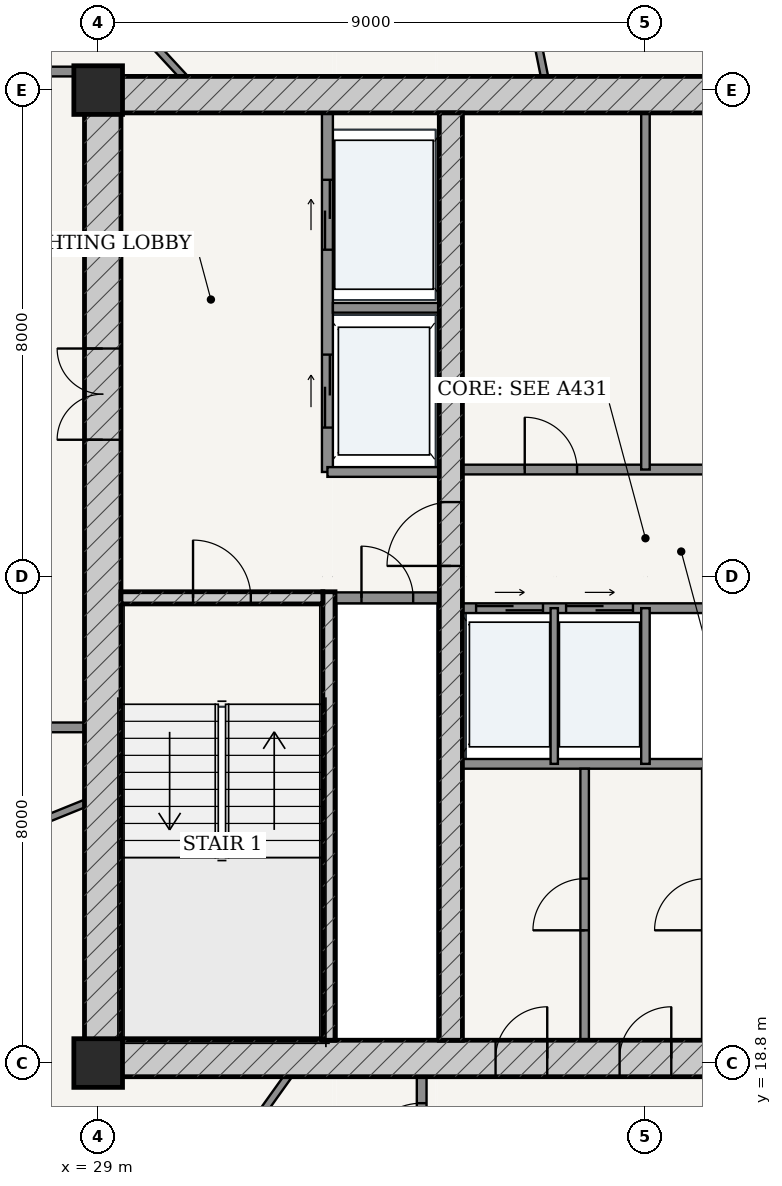
"""IFC4 building model, lengths in metres.
Left out: names, types, materials, properties, quantities, classifications, styles, units other than length and angle.
Written with IfcOpenShell. Run it as: python <this file> out.ifc"""

import sys

from ifc_helpers import new_model, si_unit, direction, frame, frame_2d, origin, origin_2d, place, context, subcontext, project, spatial, rectangle, extrude, source, transform, mapped, element, fill, save


model = new_model("IFC4")
c1 = context("Model", 3, precision=1e-05, world=origin(), true_north=direction((-0.2419218956, 0.970295726276)))
c2 = subcontext(c1, "Body", "Model", "MODEL_VIEW")
j1 = project(units=[si_unit("LENGTHUNIT", "METRE"), si_unit("PLANEANGLEUNIT", "RADIAN")], contexts=[c1])
p1 = place(None, origin())
s1 = spatial("IfcSite", under=j1, at=p1, CompositionType="ELEMENT")
p2 = place(p1, origin())
s2 = spatial("IfcBuilding", under=s1, at=p2, CompositionType="ELEMENT")
p3 = place(p2, frame((0.0, 0.0, 239.3)))
s3 = spatial("IfcBuildingStorey", under=s2, at=p3, CompositionType="ELEMENT", Elevation=239.3)
for number, where, z_axis, x_axis in (
    (1, (29.0, 18.8, 0.0), (0.0, 0.0, 1.0), (1.0, 0.0, 0.0)),
    (2, (29.0, 34.8, 0.0), (0.0, 0.0, 1.0), (1.0, 0.0, 0.0)),
):
    element("IfcColumn", number, at=place(p3, frame(where, z_axis=z_axis, x_axis=x_axis)), inside=s3, PredefinedType="COLUMN", context=c2, shape_type="SweptSolid", body=[
        extrude(rectangle(XDim=0.8, YDim=0.8, at=origin_2d()), origin(), (0.0, 0.0, 1.0), 3.7),
    ])
p4 = place(p3, frame((28.775, 18.875, 0.0), z_axis=(0.0, 0.0, 1.0), x_axis=(1.0, 0.0, 0.0)))
e3 = element("IfcWall", 3, at=p4, inside=s3, PredefinedType="SHEAR", context=c2, shape_type="SweptSolid", body=[
    extrude(rectangle(XDim=18.45, YDim=0.6, at=frame_2d((9.225, 0.0))), origin(), (0.0, 0.0, 1.0), 3.25),
])
p5 = place(p4, frame((6.76, 0.0, 0.0)))
e4 = element("IfcOpeningElement", 4, at=p5, cuts=e3, PredefinedType="OPENING", context=c2, shape_type="SweptSolid", body=[
    extrude(rectangle(XDim=0.85, YDim=2.1, at=frame_2d((0.425, 1.05))), frame((0.0, 0.31, 0.0), z_axis=(0.0, -1.0, 0.0), x_axis=(1.0, 0.0, 0.0)), (0.0, 0.0, 1.0), 0.62),
])
p6 = place(p4, frame((8.8, 0.0, 0.0)))
e5 = element("IfcOpeningElement", 5, at=p6, cuts=e3, PredefinedType="OPENING", context=c2, shape_type="SweptSolid", body=[
    extrude(rectangle(XDim=0.85, YDim=2.1, at=frame_2d((0.425, 1.05))), frame((0.0, 0.31, 0.0), z_axis=(0.0, -1.0, 0.0), x_axis=(1.0, 0.0, 0.0)), (0.0, 0.0, 1.0), 0.62),
])
p7 = place(p4, frame((10.84, 0.0, 0.0)))
e6 = element("IfcOpeningElement", 6, at=p7, cuts=e3, PredefinedType="OPENING", context=c2, shape_type="SweptSolid", body=[
    extrude(rectangle(XDim=0.85, YDim=2.1, at=frame_2d((0.425, 1.05))), frame((0.0, 0.31, 0.0), z_axis=(0.0, -1.0, 0.0), x_axis=(1.0, 0.0, 0.0)), (0.0, 0.0, 1.0), 0.62),
])
p8 = place(p3, frame((28.775, 34.725, 0.0), z_axis=(0.0, 0.0, 1.0), x_axis=(1.0, 0.0, 0.0)))
e7 = element("IfcWall", 7, at=p8, inside=s3, PredefinedType="SHEAR", context=c2, shape_type="SweptSolid", body=[
    extrude(rectangle(XDim=18.45, YDim=0.6, at=frame_2d((9.225, 0.0))), origin(), (0.0, 0.0, 1.0), 3.25),
])
p9 = place(p3, frame((29.075, 19.175, 0.0), z_axis=(0.0, 0.0, 1.0), x_axis=(0.0, 1.0, 0.0)))
e8 = element("IfcWall", 8, at=p9, inside=s3, PredefinedType="SHEAR", context=c2, shape_type="SweptSolid", body=[
    extrude(rectangle(XDim=15.25, YDim=0.6, at=frame_2d((7.625, 0.0))), origin(), (0.0, 0.0, 1.0), 3.25),
])
p10 = place(p9, frame((9.875, 0.0, 0.0)))
e9 = element("IfcOpeningElement", 9, at=p10, cuts=e8, PredefinedType="OPENING", context=c2, shape_type="SweptSolid", body=[
    extrude(rectangle(XDim=1.5, YDim=2.2, at=frame_2d((0.75, 1.1))), frame((0.0, 0.31, 0.0), z_axis=(0.0, -1.0, 0.0), x_axis=(1.0, 0.0, 0.0)), (0.0, 0.0, 1.0), 0.62),
])
p11 = place(p3, frame((32.795, 19.175, 0.0), z_axis=(0.0, 0.0, 1.0), x_axis=(0.0, 1.0, 0.0)))
e10 = element("IfcWall", 10, at=p11, inside=s3, PredefinedType="SOLIDWALL", context=c2, shape_type="SweptSolid", body=[
    extrude(rectangle(XDim=7.375, YDim=0.2, at=frame_2d((3.688, 0.0))), origin(), (0.0, 0.0, 1.0), 3.25),
])
p12 = place(p3, frame((29.375, 26.45, 0.0), z_axis=(0.0, 0.0, 1.0), x_axis=(1.0, 0.0, 0.0)))
e11 = element("IfcWall", 11, at=p12, inside=s3, PredefinedType="SOLIDWALL", context=c2, shape_type="SweptSolid", body=[
    extrude(rectangle(XDim=3.32, YDim=0.2, at=frame_2d((1.66, 0.0))), origin(), (0.0, 0.0, 1.0), 3.25),
])
p13 = place(p12, frame((1.185, 0.0, 0.0)))
e12 = element("IfcOpeningElement", 12, at=p13, cuts=e11, PredefinedType="OPENING", context=c2, shape_type="SweptSolid", body=[
    extrude(rectangle(XDim=0.95, YDim=2.15, at=frame_2d((0.475, 1.075))), frame((0.0, 0.11, 0.0), z_axis=(0.0, -1.0, 0.0), x_axis=(1.0, 0.0, 0.0)), (0.0, 0.0, 1.0), 0.22),
])
p14 = place(p3, frame((34.8, 19.175, 0.0), z_axis=(0.0, 0.0, 1.0), x_axis=(0.0, 1.0, 0.0)))
e13 = element("IfcWall", 13, at=p14, inside=s3, PredefinedType="SHEAR", context=c2, shape_type="SweptSolid", body=[
    extrude(rectangle(XDim=15.25, YDim=0.38, at=frame_2d((7.625, 0.0))), origin(), (0.0, 0.0, 1.0), 3.25),
])
p15 = place(p14, frame((7.8, 0.0, 0.0)))
e14 = element("IfcOpeningElement", 14, at=p15, cuts=e13, PredefinedType="OPENING", context=c2, shape_type="SweptSolid", body=[
    extrude(rectangle(XDim=1.05, YDim=2.15, at=frame_2d((0.525, 1.075))), frame((0.0, 0.2, 0.0), z_axis=(0.0, -1.0, 0.0), x_axis=(1.0, 0.0, 0.0)), (0.0, 0.0, 1.0), 0.4),
])
p16 = place(p3, frame((32.9, 26.45, 0.0), z_axis=(0.0, 0.0, 1.0), x_axis=(1.0, 0.0, 0.0)))
e15 = element("IfcWall", 15, at=p16, inside=s3, PredefinedType="PARTITIONING", context=c2, shape_type="SweptSolid", body=[
    extrude(rectangle(XDim=1.71, YDim=0.18, at=frame_2d((0.855, 0.0))), origin(), (0.0, 0.0, 1.0), 3.25),
])
p17 = place(p16, frame((0.43, 0.0, 0.0)))
e16 = element("IfcOpeningElement", 16, at=p17, cuts=e15, PredefinedType="OPENING", context=c2, shape_type="SweptSolid", body=[
    extrude(rectangle(XDim=0.85, YDim=2.1, at=frame_2d((0.425, 1.05))), frame((0.0, 0.1, 0.0), z_axis=(0.0, -1.0, 0.0), x_axis=(1.0, 0.0, 0.0)), (0.0, 0.0, 1.0), 0.2),
])
p18 = place(p3, frame((32.77, 28.52, 0.0), z_axis=(0.0, 0.0, 1.0), x_axis=(0.0, 1.0, 0.0)))
e17 = element("IfcWall", 17, at=p18, inside=s3, PredefinedType="PARTITIONING", context=c2, shape_type="SweptSolid", body=[
    extrude(rectangle(XDim=5.905, YDim=0.18, at=frame_2d((2.953, 0.0))), origin(), (0.0, 0.0, 1.0), 3.25),
])
p19 = place(p18, frame((3.655, 0.0, 0.0)))
e18 = element("IfcOpeningElement", 18, at=p19, cuts=e17, PredefinedType="OPENING", context=c2, shape_type="SweptSolid", body=[
    extrude(rectangle(XDim=1.15, YDim=2.2, at=frame_2d((0.575, 1.1))), frame((0.0, 0.1, 0.0), z_axis=(0.0, -1.0, 0.0), x_axis=(1.0, 0.0, 0.0)), (0.0, 0.0, 1.0), 0.2),
])
p20 = place(p18, frame((0.73, 0.0, 0.0)))
e19 = element("IfcOpeningElement", 19, at=p20, cuts=e17, PredefinedType="OPENING", context=c2, shape_type="SweptSolid", body=[
    extrude(rectangle(XDim=1.2, YDim=2.25, at=frame_2d((0.6, 1.125))), frame((0.0, 0.1, 0.0), z_axis=(0.0, -1.0, 0.0), x_axis=(1.0, 0.0, 0.0)), (0.0, 0.0, 1.0), 0.2),
])
p21 = place(p3, frame((32.86, 31.22, 0.0), z_axis=(0.0, 0.0, 1.0), x_axis=(1.0, 0.0, 0.0)))
e20 = element("IfcWall", 20, at=p21, inside=s3, PredefinedType="PARTITIONING", context=c2, shape_type="SweptSolid", body=[
    extrude(rectangle(XDim=1.75, YDim=0.16, at=frame_2d((0.875, 0.0))), origin(), (0.0, 0.0, 1.0), 3.25),
])
p22 = place(p3, frame((32.77, 28.52, 0.0), z_axis=(0.0, 0.0, 1.0), x_axis=(1.0, 0.0, 0.0)))
e21 = element("IfcWall", 21, at=p22, inside=s3, PredefinedType="PARTITIONING", context=c2, shape_type="SweptSolid", body=[
    extrude(rectangle(XDim=1.84, YDim=0.16, at=frame_2d((0.92, 0.0))), origin(), (0.0, 0.0, 1.0), 3.25),
])
p23 = place(p3, frame((34.99, 28.56, 0.0), z_axis=(0.0, 0.0, 1.0), x_axis=(1.0, 0.0, 0.0)))
e22 = element("IfcWall", 22, at=p23, inside=s3, PredefinedType="PARTITIONING", context=c2, shape_type="SweptSolid", body=[
    extrude(rectangle(XDim=6.02, YDim=0.16, at=frame_2d((3.01, 0.0))), origin(), (0.0, 0.0, 1.0), 3.25),
])
p24 = place(p23, frame((1.025, 0.0, 0.0)))
e23 = element("IfcOpeningElement", 23, at=p24, cuts=e22, PredefinedType="OPENING", context=c2, shape_type="SweptSolid", body=[
    extrude(rectangle(XDim=0.86, YDim=2.1, at=frame_2d((0.43, 1.05))), frame((0.0, 0.09, 0.0), z_axis=(0.0, -1.0, 0.0), x_axis=(1.0, 0.0, 0.0)), (0.0, 0.0, 1.0), 0.18),
])
p25 = place(p23, frame((4.14, 0.0, 0.0)))
e24 = element("IfcOpeningElement", 24, at=p25, cuts=e22, PredefinedType="OPENING", context=c2, shape_type="SweptSolid", body=[
    extrude(rectangle(XDim=0.85, YDim=2.1, at=frame_2d((0.425, 1.05))), frame((0.0, 0.09, 0.0), z_axis=(0.0, -1.0, 0.0), x_axis=(1.0, 0.0, 0.0)), (0.0, 0.0, 1.0), 0.18),
])
p26 = place(p3, frame((38.0, 28.56, 0.0), z_axis=(0.0, 0.0, 1.0), x_axis=(0.0, 1.0, 0.0)))
e25 = element("IfcWall", 25, at=p26, inside=s3, PredefinedType="PARTITIONING", context=c2, shape_type="SweptSolid", body=[
    extrude(rectangle(XDim=5.865, YDim=0.14, at=frame_2d((2.933, 0.0))), origin(), (0.0, 0.0, 1.0), 3.25),
])
p27 = place(p3, frame((34.99, 26.28, 0.0), z_axis=(0.0, 0.0, 1.0), x_axis=(1.0, 0.0, 0.0)))
e26 = element("IfcWall", 26, at=p27, inside=s3, PredefinedType="PARTITIONING", context=c2, shape_type="SweptSolid", body=[
    extrude(rectangle(XDim=6.02, YDim=0.16, at=frame_2d((3.01, 0.0))), origin(), (0.0, 0.0, 1.0), 3.25),
])
p28 = place(p27, frame((0.225, 0.0, 0.0)))
e27 = element("IfcOpeningElement", 27, at=p28, cuts=e26, PredefinedType="OPENING", context=c2, shape_type="SweptSolid", body=[
    extrude(rectangle(XDim=1.1, YDim=2.2, at=frame_2d((0.55, 1.1))), frame((0.0, 0.09, 0.0), z_axis=(0.0, -1.0, 0.0), x_axis=(1.0, 0.0, 0.0)), (0.0, 0.0, 1.0), 0.18),
])
p29 = place(p27, frame((1.705, 0.0, 0.0)))
e28 = element("IfcOpeningElement", 28, at=p29, cuts=e26, PredefinedType="OPENING", context=c2, shape_type="SweptSolid", body=[
    extrude(rectangle(XDim=1.1, YDim=2.2, at=frame_2d((0.55, 1.1))), frame((0.0, 0.09, 0.0), z_axis=(0.0, -1.0, 0.0), x_axis=(1.0, 0.0, 0.0)), (0.0, 0.0, 1.0), 0.18),
])
p30 = place(p3, frame((34.99, 23.72, 0.0), z_axis=(0.0, 0.0, 1.0), x_axis=(1.0, 0.0, 0.0)))
e29 = element("IfcWall", 29, at=p30, inside=s3, PredefinedType="PARTITIONING", context=c2, shape_type="SweptSolid", body=[
    extrude(rectangle(XDim=6.02, YDim=0.16, at=frame_2d((3.01, 0.0))), origin(), (0.0, 0.0, 1.0), 3.25),
])
p31 = place(p3, frame((36.5, 23.72, 0.0), z_axis=(0.0, 0.0, 1.0), x_axis=(0.0, 1.0, 0.0)))
e30 = element("IfcWall", 30, at=p31, inside=s3, PredefinedType="PARTITIONING", context=c2, shape_type="SweptSolid", body=[
    extrude(rectangle(XDim=2.56, YDim=0.12, at=frame_2d((1.28, 0.0))), origin(), (0.0, 0.0, 1.0), 3.25),
])
p32 = place(p3, frame((38.0, 23.72, 0.0), z_axis=(0.0, 0.0, 1.0), x_axis=(0.0, 1.0, 0.0)))
e31 = element("IfcWall", 31, at=p32, inside=s3, PredefinedType="PARTITIONING", context=c2, shape_type="SweptSolid", body=[
    extrude(rectangle(XDim=2.56, YDim=0.14, at=frame_2d((1.28, 0.0))), origin(), (0.0, 0.0, 1.0), 3.25),
])
p33 = place(p3, frame((37.0, 19.175, 0.0), z_axis=(0.0, 0.0, 1.0), x_axis=(0.0, 1.0, 0.0)))
e32 = element("IfcWall", 32, at=p33, inside=s3, PredefinedType="PARTITIONING", context=c2, shape_type="SweptSolid", body=[
    extrude(rectangle(XDim=4.465, YDim=0.14, at=frame_2d((2.232, 0.0))), origin(), (0.0, 0.0, 1.0), 3.25),
])
p34 = place(p33, frame((1.808, 0.0, 0.0)))
e33 = element("IfcOpeningElement", 33, at=p34, cuts=e32, PredefinedType="OPENING", context=c2, shape_type="SweptSolid", body=[
    extrude(rectangle(XDim=0.85, YDim=2.1, at=frame_2d((0.425, 1.05))), frame((0.0, 0.08, 0.0), z_axis=(0.0, -1.0, 0.0), x_axis=(1.0, 0.0, 0.0)), (0.0, 0.0, 1.0), 0.16),
])
for number, where, z_axis, x_axis in (
    (34, (26.845, 35.105, 0.0), (0.0, 0.0, 1.0), (1.0, 0.0, 0.0)),
    (35, (26.845, 24.32, 0.0), (0.0, 0.0, 1.0), (1.0, 0.0, 0.0)),
):
    element("IfcWall", number, at=place(p3, frame(where, z_axis=z_axis, x_axis=x_axis)), inside=s3, PredefinedType="PARTITIONING", context=c2, shape_type="SweptSolid", body=[
        extrude(rectangle(XDim=1.93, YDim=0.16, at=frame_2d((0.965, 0.0))), origin(), (0.0, 0.0, 1.0), 3.25),
    ])
p35 = place(p3, frame((34.32, 16.725, 0.0), z_axis=(0.0, 0.0, 1.0), x_axis=(0.0, 1.0, 0.0)))
e36 = element("IfcWall", 36, at=p35, inside=s3, PredefinedType="PARTITIONING", context=c2, shape_type="SweptSolid", body=[
    extrude(rectangle(XDim=1.85, YDim=0.16, at=frame_2d((0.925, 0.0))), origin(), (0.0, 0.0, 1.0), 3.25),
])
p36 = place(p35, frame((0.435, 0.0, 0.0)))
e37 = element("IfcOpeningElement", 37, at=p36, cuts=e36, PredefinedType="OPENING", context=c2, shape_type="SweptSolid", body=[
    extrude(rectangle(XDim=0.98, YDim=2.2, at=frame_2d((0.49, 1.1))), frame((0.0, 0.09, 0.0), z_axis=(0.0, -1.0, 0.0), x_axis=(1.0, 0.0, 0.0)), (0.0, 0.0, 1.0), 0.18),
])
p37 = place(p3, frame((36.339, 35.027, 0.0), z_axis=(0.0, 0.0, 1.0), x_axis=(-0.197903570547, 0.980221493727, 0.0)))
e38 = element("IfcWall", 38, at=p37, inside=s3, PredefinedType="PARTITIONING", context=c2, shape_type="SweptSolid", body=[
    extrude(rectangle(XDim=2.915, YDim=0.12, at=frame_2d((1.458, 0.0))), origin(), (0.0, 0.0, 1.0), 2.34),
])
p38 = place(p3, frame((30.396, 35.026, 0.0), z_axis=(0.0, 0.0, 1.0), x_axis=(-0.678748871003, 0.73437045836, 0.0)))
e39 = element("IfcWall", 39, at=p38, inside=s3, PredefinedType="PARTITIONING", context=c2, shape_type="SweptSolid", body=[
    extrude(rectangle(XDim=4.13, YDim=0.12, at=frame_2d((2.065, 0.0))), origin(), (0.0, 0.0, 1.0), 2.775),
])
p39 = place(p3, frame((28.775, 23.067, 0.0), z_axis=(0.0, 0.0, 1.0), x_axis=(-0.926979373422, -0.375112304851, 0.0)))
e40 = element("IfcWall", 40, at=p39, inside=s3, PredefinedType="PARTITIONING", context=c2, shape_type="SweptSolid", body=[
    extrude(rectangle(XDim=4.656, YDim=0.12, at=frame_2d((2.328, 0.0))), origin(), (0.0, 0.0, 1.0), 2.969),
])
p40 = place(p39, frame((1.898, 0.0, 0.0)))
e41 = element("IfcOpeningElement", 41, at=p40, cuts=e40, PredefinedType="OPENING", context=c2, shape_type="SweptSolid", body=[
    extrude(rectangle(XDim=0.86, YDim=2.15, at=frame_2d((0.43, 1.075))), frame((0.0, 0.07, 0.0), z_axis=(0.0, -1.0, 0.0), x_axis=(1.0, 0.0, 0.0)), (0.0, 0.0, 1.0), 0.14),
])
p41 = place(p3, frame((32.117, 18.575, 0.0), z_axis=(0.0, 0.0, 1.0), x_axis=(-0.581800974427, -0.81333119094, 0.0)))
e42 = element("IfcWall", 42, at=p41, inside=s3, PredefinedType="PARTITIONING", context=c2, shape_type="SweptSolid", body=[
    extrude(rectangle(XDim=3.528, YDim=0.12, at=frame_2d((1.764, 0.0))), origin(), (0.0, 0.0, 1.0), 3.25),
])
p42 = place(p41, frame((1.314, 0.0, 0.0)))
e43 = element("IfcOpeningElement", 43, at=p42, cuts=e42, PredefinedType="OPENING", context=c2, shape_type="SweptSolid", body=[
    extrude(rectangle(XDim=0.9, YDim=2.15, at=frame_2d((0.45, 1.075))), frame((0.0, 0.07, 0.0), z_axis=(0.0, -1.0, 0.0), x_axis=(1.0, 0.0, 0.0)), (0.0, 0.0, 1.0), 0.14),
])
m1 = source(origin(), c2, "Body", "SweptSolid", [
    extrude(rectangle(XDim=1.5, YDim=2.2, at=frame_2d((0.75, 1.1))), frame((0.0, 0.025, 0.0), z_axis=(0.0, -1.0, 0.0), x_axis=(1.0, 0.0, 0.0)), (0.0, 0.0, 1.0), 0.05),
])
p43 = place(p10, origin())
e44 = element("IfcDoor", 44, at=p43, inside=s3, OperationType="DOUBLE_DOOR_SINGLE_SWING", PredefinedType="DOOR", context=c2, shape_type="MappedRepresentation", body=[
    mapped(m1, transform((0.0, 0.0, 0.0), scale=1.0)),
])
fill(e9, e44)
m2 = source(origin(), c2, "Body", "SweptSolid", [
    extrude(rectangle(XDim=1.05, YDim=2.15, at=frame_2d((0.525, 1.075))), frame((0.0, 0.025, 0.0), z_axis=(0.0, -1.0, 0.0), x_axis=(1.0, 0.0, 0.0)), (0.0, 0.0, 1.0), 0.05),
])
p44 = place(p15, origin())
e45 = element("IfcDoor", 45, at=p44, inside=s3, OperationType="SINGLE_SWING_LEFT", PredefinedType="DOOR", context=c2, shape_type="MappedRepresentation", body=[
    mapped(m2, transform((0.0, 0.0, 0.0), scale=1.0)),
])
fill(e14, e45)
m3 = source(origin(), c2, "Body", "SweptSolid", [
    extrude(rectangle(XDim=0.95, YDim=2.15, at=frame_2d((0.475, 1.075))), frame((0.0, 0.025, 0.0), z_axis=(0.0, -1.0, 0.0), x_axis=(1.0, 0.0, 0.0)), (0.0, 0.0, 1.0), 0.05),
])
p45 = place(p13, origin())
e46 = element("IfcDoor", 46, at=p45, inside=s3, OperationType="SINGLE_SWING_LEFT", PredefinedType="DOOR", context=c2, shape_type="MappedRepresentation", body=[
    mapped(m3, transform((0.0, 0.0, 0.0), scale=1.0)),
])
fill(e12, e46)
m4 = source(origin(), c2, "Body", "SweptSolid", [
    extrude(rectangle(XDim=0.85, YDim=2.1, at=frame_2d((0.425, 1.05))), frame((0.0, 0.025, 0.0), z_axis=(0.0, -1.0, 0.0), x_axis=(1.0, 0.0, 0.0)), (0.0, 0.0, 1.0), 0.05),
])
p46 = place(p17, origin())
e47 = element("IfcDoor", 47, at=p46, inside=s3, OperationType="SINGLE_SWING_LEFT", PredefinedType="DOOR", context=c2, shape_type="MappedRepresentation", body=[
    mapped(m4, transform((0.0, 0.0, 0.0), scale=1.0)),
])
fill(e16, e47)
m5 = source(origin(), c2, "Body", "SweptSolid", [
    extrude(rectangle(XDim=0.86, YDim=2.1, at=frame_2d((0.43, 1.05))), frame((0.0, 0.025, 0.0), z_axis=(0.0, -1.0, 0.0), x_axis=(1.0, 0.0, 0.0)), (0.0, 0.0, 1.0), 0.05),
])
p47 = place(p24, origin())
e48 = element("IfcDoor", 48, at=p47, inside=s3, OperationType="SINGLE_SWING_LEFT", PredefinedType="DOOR", context=c2, shape_type="MappedRepresentation", body=[
    mapped(m5, transform((0.0, 0.0, 0.0), scale=1.0)),
])
fill(e23, e48)
p48 = place(p5, origin())
e49 = element("IfcDoor", 49, at=p48, inside=s3, OperationType="SINGLE_SWING_RIGHT", PredefinedType="DOOR", context=c2, shape_type="MappedRepresentation", body=[
    mapped(m4, transform((0.0, 0.0, 0.0), scale=1.0)),
])
fill(e4, e49)
p49 = place(p6, origin())
e50 = element("IfcDoor", 50, at=p49, inside=s3, OperationType="SINGLE_SWING_RIGHT", PredefinedType="DOOR", context=c2, shape_type="MappedRepresentation", body=[
    mapped(m4, transform((0.0, 0.0, 0.0), scale=1.0)),
])
fill(e5, e50)
p50 = place(p34, origin())
e51 = element("IfcDoor", 51, at=p50, inside=s3, OperationType="SINGLE_SWING_LEFT", PredefinedType="DOOR", context=c2, shape_type="MappedRepresentation", body=[
    mapped(m4, transform((0.0, 0.0, 0.0), scale=1.0)),
])
fill(e33, e51)
m6 = source(origin(), c2, "Body", "SweptSolid", [
    extrude(rectangle(XDim=1.15, YDim=2.2, at=frame_2d((0.575, 1.1))), frame((0.0, 0.025, 0.0), z_axis=(0.0, -1.0, 0.0), x_axis=(1.0, 0.0, 0.0)), (0.0, 0.0, 1.0), 0.05),
])
p51 = place(p19, origin())
e52 = element("IfcDoor", 52, at=p51, inside=s3, OperationType="DOUBLE_DOOR_SLIDING", PredefinedType="DOOR", context=c2, shape_type="MappedRepresentation", body=[
    mapped(m6, transform((0.0, 0.0, 0.0), scale=1.0)),
])
fill(e18, e52)
m7 = source(origin(), c2, "Body", "SweptSolid", [
    extrude(rectangle(XDim=1.2, YDim=2.25, at=frame_2d((0.6, 1.125))), frame((0.0, 0.025, 0.0), z_axis=(0.0, -1.0, 0.0), x_axis=(1.0, 0.0, 0.0)), (0.0, 0.0, 1.0), 0.05),
])
p52 = place(p20, origin())
e53 = element("IfcDoor", 53, at=p52, inside=s3, OperationType="DOUBLE_DOOR_SLIDING", PredefinedType="DOOR", context=c2, shape_type="MappedRepresentation", body=[
    mapped(m7, transform((0.0, 0.0, 0.0), scale=1.0)),
])
fill(e19, e53)
m8 = source(origin(), c2, "Body", "SweptSolid", [
    extrude(rectangle(XDim=1.1, YDim=2.2, at=frame_2d((0.55, 1.1))), frame((0.0, 0.025, 0.0), z_axis=(0.0, -1.0, 0.0), x_axis=(1.0, 0.0, 0.0)), (0.0, 0.0, 1.0), 0.05),
])
p53 = place(p28, origin())
e54 = element("IfcDoor", 54, at=p53, inside=s3, OperationType="DOUBLE_DOOR_SLIDING", PredefinedType="DOOR", context=c2, shape_type="MappedRepresentation", body=[
    mapped(m8, transform((0.0, 0.0, 0.0), scale=1.0)),
])
fill(e27, e54)
p54 = place(p29, origin())
e55 = element("IfcDoor", 55, at=p54, inside=s3, OperationType="DOUBLE_DOOR_SLIDING", PredefinedType="DOOR", context=c2, shape_type="MappedRepresentation", body=[
    mapped(m8, transform((0.0, 0.0, 0.0), scale=1.0)),
])
fill(e28, e55)
m9 = source(origin(), c2, "Body", "SweptSolid", [
    extrude(rectangle(XDim=0.98, YDim=2.2, at=frame_2d((0.49, 1.1))), frame((0.0, 0.025, 0.0), z_axis=(0.0, -1.0, 0.0), x_axis=(1.0, 0.0, 0.0)), (0.0, 0.0, 1.0), 0.05),
])
p55 = place(p36, origin())
e56 = element("IfcDoor", 56, at=p55, inside=s3, OperationType="SINGLE_SWING_LEFT", PredefinedType="DOOR", context=c2, shape_type="MappedRepresentation", body=[
    mapped(m9, transform((0.0, 0.0, 0.0), scale=1.0)),
])
fill(e37, e56)
save(model, sys.argv[1])
